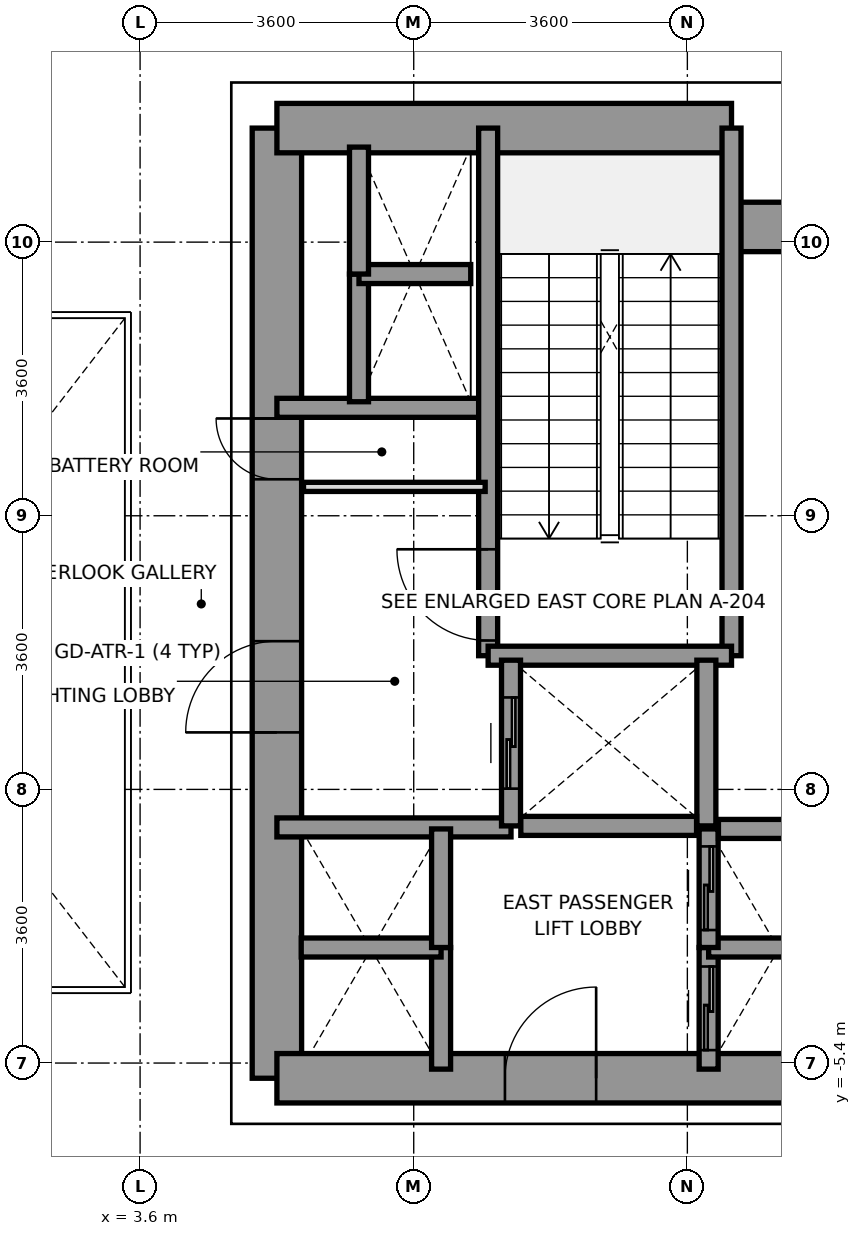
"""IFC4 building model, lengths in metres.
Left out: names, types, materials, properties, quantities, classifications, styles, units other than length and angle.
Written with IfcOpenShell. Run it as: python <this file> out.ifc"""

import sys

from ifc_helpers import new_model, si_unit, direction, frame, frame_2d, origin, place, context, subcontext, project, spatial, rectangle, extrude, source, transform, mapped, element, fill, save


model = new_model("IFC4")
c1 = context("Model", 3, precision=1e-05, world=origin(), true_north=direction((0.0, 1.0)))
c2 = subcontext(c1, "Body", "Model", "MODEL_VIEW")
j1 = project(units=[si_unit("LENGTHUNIT", "METRE"), si_unit("PLANEANGLEUNIT", "RADIAN")], contexts=[c1])
p1 = place(None, origin())
s1 = spatial("IfcSite", under=j1, at=p1, CompositionType="ELEMENT")
p2 = place(p1, origin())
s2 = spatial("IfcBuilding", under=s1, at=p2, CompositionType="ELEMENT")
p3 = place(p2, frame((0.0, 0.0, 5.4)))
s3 = spatial("IfcBuildingStorey", under=s2, at=p3, CompositionType="ELEMENT", Elevation=5.4)
p4 = place(p3, frame((5.4, -5.6, 0.0), z_axis=(0.0, 0.0, 1.0), x_axis=(0.0, 1.0, 0.0)))
e1 = element("IfcWall", 1, at=p4, inside=s3, PredefinedType="SHEAR", context=c2, shape_type="SweptSolid", body=[
    extrude(rectangle(XDim=12.5, YDim=0.65, at=frame_2d((6.25, 0.0))), origin(), (0.0, 0.0, 1.0), 4.52),
])
p5 = place(p4, frame((4.55, 0.0, 0.0)))
e2 = element("IfcOpeningElement", 2, at=p5, cuts=e1, PredefinedType="OPENING", context=c2, shape_type="SweptSolid", body=[
    extrude(rectangle(XDim=1.2, YDim=2.2, at=frame_2d((0.6, 1.1))), frame((0.0, 0.335, 0.0), z_axis=(0.0, -1.0, 0.0), x_axis=(1.0, 0.0, 0.0)), (0.0, 0.0, 1.0), 0.67),
])
p6 = place(p4, frame((7.88, 0.0, 0.0)))
e3 = element("IfcOpeningElement", 3, at=p6, cuts=e1, PredefinedType="OPENING", context=c2, shape_type="SweptSolid", body=[
    extrude(rectangle(XDim=0.8, YDim=2.1, at=frame_2d((0.4, 1.05))), frame((0.0, 0.335, 0.0), z_axis=(0.0, -1.0, 0.0), x_axis=(1.0, 0.0, 0.0)), (0.0, 0.0, 1.0), 0.67),
])
p7 = place(p3, frame((5.4, 6.9, 0.0), z_axis=(0.0, 0.0, 1.0), x_axis=(1.0, 0.0, 0.0)))
e4 = element("IfcWall", 4, at=p7, inside=s3, PredefinedType="SHEAR", context=c2, shape_type="SweptSolid", body=[
    extrude(rectangle(XDim=5.981, YDim=0.65, at=frame_2d((2.991, 0.0))), origin(), (0.0, 0.0, 1.0), 4.52),
])
p8 = place(p3, frame((11.381, 5.6, 0.0), z_axis=(0.0, 0.0, 1.0), x_axis=(1.0, 0.0, 0.0)))
e5 = element("IfcWall", 5, at=p8, inside=s3, PredefinedType="SHEAR", context=c2, shape_type="SweptSolid", body=[
    extrude(rectangle(XDim=1.819, YDim=0.65, at=frame_2d((0.909, 0.0))), origin(), (0.0, 0.0, 1.0), 4.52),
])
p9 = place(p3, frame((5.4, -5.6, 0.0), z_axis=(0.0, 0.0, 1.0), x_axis=(1.0, 0.0, 0.0)))
e6 = element("IfcWall", 6, at=p9, inside=s3, PredefinedType="SHEAR", context=c2, shape_type="SweptSolid", body=[
    extrude(rectangle(XDim=7.8, YDim=0.65, at=frame_2d((3.9, 0.0))), origin(), (0.0, 0.0, 1.0), 4.52),
])
p10 = place(p9, frame((3.0, 0.0, 0.0)))
e7 = element("IfcOpeningElement", 7, at=p10, cuts=e6, PredefinedType="OPENING", context=c2, shape_type="SweptSolid", body=[
    extrude(rectangle(XDim=1.2, YDim=2.2, at=frame_2d((0.6, 1.1))), frame((0.0, 0.335, 0.0), z_axis=(0.0, -1.0, 0.0), x_axis=(1.0, 0.0, 0.0)), (0.0, 0.0, 1.0), 0.67),
])
p11 = place(p3, frame((5.4, 3.22, 0.0), z_axis=(0.0, 0.0, 1.0), x_axis=(1.0, 0.0, 0.0)))
e8 = element("IfcWall", 8, at=p11, inside=s3, PredefinedType="SOLIDWALL", context=c2, shape_type="SweptSolid", body=[
    extrude(rectangle(XDim=2.78, YDim=0.25, at=frame_2d((1.39, 0.0))), origin(), (0.0, 0.0, 1.0), 4.52),
])
p12 = place(p3, frame((5.4, -2.3, 0.0), z_axis=(0.0, 0.0, 1.0), x_axis=(1.0, 0.0, 0.0)))
e9 = element("IfcWall", 9, at=p12, inside=s3, PredefinedType="SOLIDWALL", context=c2, shape_type="SweptSolid", body=[
    extrude(rectangle(XDim=3.08, YDim=0.25, at=frame_2d((1.54, 0.0))), origin(), (0.0, 0.0, 1.0), 4.52),
])
p13 = place(p3, frame((8.179, -0.041, 0.0), z_axis=(0.0, 0.0, 1.0), x_axis=(0.0, 1.0, 0.0)))
e10 = element("IfcWall", 10, at=p13, inside=s3, PredefinedType="SOLIDWALL", context=c2, shape_type="SweptSolid", body=[
    extrude(rectangle(XDim=6.941, YDim=0.25, at=frame_2d((3.47, 0.0))), origin(), (0.0, 0.0, 1.0), 4.52),
])
p14 = place(p13, frame((0.2, 0.0, 0.0)))
e11 = element("IfcOpeningElement", 11, at=p14, cuts=e10, PredefinedType="OPENING", context=c2, shape_type="SweptSolid", body=[
    extrude(rectangle(XDim=1.2, YDim=2.2, at=frame_2d((0.6, 1.1))), frame((0.0, 0.135, 0.0), z_axis=(0.0, -1.0, 0.0), x_axis=(1.0, 0.0, 0.0)), (0.0, 0.0, 1.0), 0.27),
])
p15 = place(p3, frame((11.381, -0.041, 0.0), z_axis=(0.0, 0.0, 1.0), x_axis=(0.0, 1.0, 0.0)))
e12 = element("IfcWall", 12, at=p15, inside=s3, PredefinedType="SOLIDWALL", context=c2, shape_type="SweptSolid", body=[
    extrude(rectangle(XDim=6.941, YDim=0.25, at=frame_2d((3.47, 0.0))), origin(), (0.0, 0.0, 1.0), 4.52),
])
p16 = place(p3, frame((8.179, -0.041, 0.0), z_axis=(0.0, 0.0, 1.0), x_axis=(1.0, 0.0, 0.0)))
e13 = element("IfcWall", 13, at=p16, inside=s3, PredefinedType="SOLIDWALL", context=c2, shape_type="SweptSolid", body=[
    extrude(rectangle(XDim=3.202, YDim=0.25, at=frame_2d((1.601, 0.0))), origin(), (0.0, 0.0, 1.0), 4.52),
])
p17 = place(p3, frame((8.48, -2.28, 0.0), z_axis=(0.0, 0.0, 1.0), x_axis=(0.0, 1.0, 0.0)))
e14 = element("IfcWall", 14, at=p17, inside=s3, PredefinedType="SOLIDWALL", context=c2, shape_type="SweptSolid", body=[
    extrude(rectangle(XDim=2.18, YDim=0.25, at=frame_2d((1.09, 0.0))), origin(), (0.0, 0.0, 1.0), 4.52),
])
p18 = place(p17, frame((0.49, 0.0, 0.0)))
e15 = element("IfcOpeningElement", 15, at=p18, cuts=e14, PredefinedType="OPENING", context=c2, shape_type="SweptSolid", body=[
    extrude(rectangle(XDim=1.2, YDim=2.2, at=frame_2d((0.6, 1.1))), frame((0.0, 0.135, 0.0), z_axis=(0.0, -1.0, 0.0), x_axis=(1.0, 0.0, 0.0)), (0.0, 0.0, 1.0), 0.27),
])
p19 = place(p3, frame((11.05, -2.28, 0.0), z_axis=(0.0, 0.0, 1.0), x_axis=(0.0, 1.0, 0.0)))
e16 = element("IfcWall", 16, at=p19, inside=s3, PredefinedType="SOLIDWALL", context=c2, shape_type="SweptSolid", body=[
    extrude(rectangle(XDim=2.18, YDim=0.25, at=frame_2d((1.09, 0.0))), origin(), (0.0, 0.0, 1.0), 4.52),
])
p20 = place(p3, frame((8.609, -2.28, 0.0), z_axis=(0.0, 0.0, 1.0), x_axis=(1.0, 0.0, 0.0)))
e17 = element("IfcWall", 17, at=p20, inside=s3, PredefinedType="SOLIDWALL", context=c2, shape_type="SweptSolid", body=[
    extrude(rectangle(XDim=2.312, YDim=0.25, at=frame_2d((1.156, 0.0))), origin(), (0.0, 0.0, 1.0), 4.52),
])
p21 = place(p3, frame((11.08, -5.48, 0.0), z_axis=(0.0, 0.0, 1.0), x_axis=(0.0, 1.0, 0.0)))
e18 = element("IfcWall", 18, at=p21, inside=s3, PredefinedType="SOLIDWALL", context=c2, shape_type="SweptSolid", body=[
    extrude(rectangle(XDim=1.6, YDim=0.25, at=frame_2d((0.8, 0.0))), origin(), (0.0, 0.0, 1.0), 4.52),
])
p22 = place(p21, frame((0.25, 0.0, 0.0)))
e19 = element("IfcOpeningElement", 19, at=p22, cuts=e18, PredefinedType="OPENING", context=c2, shape_type="SweptSolid", body=[
    extrude(rectangle(XDim=1.1, YDim=2.2, at=frame_2d((0.55, 1.1))), frame((0.0, 0.135, 0.0), z_axis=(0.0, -1.0, 0.0), x_axis=(1.0, 0.0, 0.0)), (0.0, 0.0, 1.0), 0.27),
])
p23 = place(p3, frame((11.08, -3.88, 0.0), z_axis=(0.0, 0.0, 1.0), x_axis=(1.0, 0.0, 0.0)))
e20 = element("IfcWall", 20, at=p23, inside=s3, PredefinedType="SOLIDWALL", context=c2, shape_type="SweptSolid", body=[
    extrude(rectangle(XDim=1.84, YDim=0.25, at=frame_2d((0.92, 0.0))), origin(), (0.0, 0.0, 1.0), 4.52),
])
p24 = place(p3, frame((11.08, -3.88, 0.0), z_axis=(0.0, 0.0, 1.0), x_axis=(0.0, 1.0, 0.0)))
e21 = element("IfcWall", 21, at=p24, inside=s3, PredefinedType="SOLIDWALL", context=c2, shape_type="SweptSolid", body=[
    extrude(rectangle(XDim=1.56, YDim=0.25, at=frame_2d((0.78, 0.0))), origin(), (0.0, 0.0, 1.0), 4.52),
])
p25 = place(p24, frame((0.23, 0.0, 0.0)))
e22 = element("IfcOpeningElement", 22, at=p25, cuts=e21, PredefinedType="OPENING", context=c2, shape_type="SweptSolid", body=[
    extrude(rectangle(XDim=1.1, YDim=2.2, at=frame_2d((0.55, 1.1))), frame((0.0, 0.135, 0.0), z_axis=(0.0, -1.0, 0.0), x_axis=(1.0, 0.0, 0.0)), (0.0, 0.0, 1.0), 0.27),
])
p26 = place(p3, frame((11.209, -2.32, 0.0), z_axis=(0.0, 0.0, 1.0), x_axis=(1.0, 0.0, 0.0)))
e23 = element("IfcWall", 23, at=p26, inside=s3, PredefinedType="SOLIDWALL", context=c2, shape_type="SweptSolid", body=[
    extrude(rectangle(XDim=1.582, YDim=0.25, at=frame_2d((0.791, 0.0))), origin(), (0.0, 0.0, 1.0), 4.52),
])
p27 = place(p3, frame((7.56, -5.48, 0.0), z_axis=(0.0, 0.0, 1.0), x_axis=(0.0, 1.0, 0.0)))
e24 = element("IfcWall", 24, at=p27, inside=s3, PredefinedType="SOLIDWALL", context=c2, shape_type="SweptSolid", body=[
    extrude(rectangle(XDim=1.6, YDim=0.25, at=frame_2d((0.8, 0.0))), origin(), (0.0, 0.0, 1.0), 4.52),
])
p28 = place(p3, frame((5.72, -3.88, 0.0), z_axis=(0.0, 0.0, 1.0), x_axis=(1.0, 0.0, 0.0)))
e25 = element("IfcWall", 25, at=p28, inside=s3, PredefinedType="SOLIDWALL", context=c2, shape_type="SweptSolid", body=[
    extrude(rectangle(XDim=1.84, YDim=0.25, at=frame_2d((0.92, 0.0))), origin(), (0.0, 0.0, 1.0), 4.52),
])
p29 = place(p3, frame((7.56, -3.88, 0.0), z_axis=(0.0, 0.0, 1.0), x_axis=(0.0, 1.0, 0.0)))
e26 = element("IfcWall", 26, at=p29, inside=s3, PredefinedType="SOLIDWALL", context=c2, shape_type="SweptSolid", body=[
    extrude(rectangle(XDim=1.56, YDim=0.25, at=frame_2d((0.78, 0.0))), origin(), (0.0, 0.0, 1.0), 4.52),
])
p30 = place(p3, frame((6.48, 3.3, 0.0), z_axis=(0.0, 0.0, 1.0), x_axis=(0.0, 1.0, 0.0)))
e27 = element("IfcWall", 27, at=p30, inside=s3, PredefinedType="SOLIDWALL", context=c2, shape_type="SweptSolid", body=[
    extrude(rectangle(XDim=1.68, YDim=0.25, at=frame_2d((0.84, 0.0))), origin(), (0.0, 0.0, 1.0), 4.52),
])
p31 = place(p3, frame((6.48, 4.98, 0.0), z_axis=(0.0, 0.0, 1.0), x_axis=(1.0, 0.0, 0.0)))
e28 = element("IfcWall", 28, at=p31, inside=s3, PredefinedType="SOLIDWALL", context=c2, shape_type="SweptSolid", body=[
    extrude(rectangle(XDim=1.47, YDim=0.25, at=frame_2d((0.735, 0.0))), origin(), (0.0, 0.0, 1.0), 4.52),
])
p32 = place(p3, frame((6.48, 4.98, 0.0), z_axis=(0.0, 0.0, 1.0), x_axis=(0.0, 1.0, 0.0)))
e29 = element("IfcWall", 29, at=p32, inside=s3, PredefinedType="SOLIDWALL", context=c2, shape_type="SweptSolid", body=[
    extrude(rectangle(XDim=1.67, YDim=0.25, at=frame_2d((0.835, 0.0))), origin(), (0.0, 0.0, 1.0), 4.52),
])
p33 = place(p3, frame((5.75, 2.18, 0.0), z_axis=(0.0, 0.0, 1.0), x_axis=(1.0, 0.0, 0.0)))
e30 = element("IfcWall", 30, at=p33, inside=s3, PredefinedType="PARTITIONING", context=c2, shape_type="SweptSolid", body=[
    extrude(rectangle(XDim=2.39, YDim=0.12, at=frame_2d((1.195, 0.0))), origin(), (0.0, 0.0, 1.0), 3.62),
])
m1 = source(origin(), c2, "Body", "SweptSolid", [
    extrude(rectangle(XDim=1.2, YDim=2.2, at=frame_2d((0.6, 1.1))), frame((0.0, 0.025, 0.0), z_axis=(0.0, -1.0, 0.0), x_axis=(1.0, 0.0, 0.0)), (0.0, 0.0, 1.0), 0.05),
])
p34 = place(p14, origin())
e31 = element("IfcDoor", 31, at=p34, inside=s3, OperationType="SINGLE_SWING_RIGHT", PredefinedType="DOOR", context=c2, shape_type="MappedRepresentation", body=[
    mapped(m1, transform((0.0, 0.0, 0.0), x_axis=(1.0, 0.0, 0.0), y_axis=(0.0, 1.0, 0.0), z_axis=(0.0, 0.0, 1.0), scale=1.0)),
])
fill(e11, e31)
p35 = place(p5, origin())
e32 = element("IfcDoor", 32, at=p35, inside=s3, OperationType="SINGLE_SWING_LEFT", PredefinedType="DOOR", context=c2, shape_type="MappedRepresentation", body=[
    mapped(m1, transform((0.0, 0.0, 0.0), x_axis=(1.0, 0.0, 0.0), y_axis=(0.0, 1.0, 0.0), z_axis=(0.0, 0.0, 1.0), scale=1.0)),
])
fill(e2, e32)
p36 = place(p10, origin())
e33 = element("IfcDoor", 33, at=p36, inside=s3, OperationType="SINGLE_SWING_RIGHT", PredefinedType="DOOR", context=c2, shape_type="MappedRepresentation", body=[
    mapped(m1, transform((0.0, 0.0, 0.0), x_axis=(1.0, 0.0, 0.0), y_axis=(0.0, 1.0, 0.0), z_axis=(0.0, 0.0, 1.0), scale=1.0)),
])
fill(e7, e33)
m2 = source(origin(), c2, "Body", "SweptSolid", [
    extrude(rectangle(XDim=0.8, YDim=2.1, at=frame_2d((0.4, 1.05))), frame((0.0, 0.025, 0.0), z_axis=(0.0, -1.0, 0.0), x_axis=(1.0, 0.0, 0.0)), (0.0, 0.0, 1.0), 0.05),
])
p37 = place(p6, origin())
e34 = element("IfcDoor", 34, at=p37, inside=s3, OperationType="SINGLE_SWING_RIGHT", PredefinedType="DOOR", context=c2, shape_type="MappedRepresentation", body=[
    mapped(m2, transform((0.0, 0.0, 0.0), x_axis=(1.0, 0.0, 0.0), y_axis=(0.0, 1.0, 0.0), z_axis=(0.0, 0.0, 1.0), scale=1.0)),
])
fill(e3, e34)
p38 = place(p18, origin())
e35 = element("IfcDoor", 35, at=p38, inside=s3, OperationType="SLIDING_TO_RIGHT", PredefinedType="DOOR", context=c2, shape_type="MappedRepresentation", body=[
    mapped(m1, transform((0.0, 0.0, 0.0), x_axis=(1.0, 0.0, 0.0), y_axis=(0.0, 1.0, 0.0), z_axis=(0.0, 0.0, 1.0), scale=1.0)),
])
fill(e15, e35)
m3 = source(origin(), c2, "Body", "SweptSolid", [
    extrude(rectangle(XDim=1.1, YDim=2.2, at=frame_2d((0.55, 1.1))), frame((0.0, 0.025, 0.0), z_axis=(0.0, -1.0, 0.0), x_axis=(1.0, 0.0, 0.0)), (0.0, 0.0, 1.0), 0.05),
])
p39 = place(p22, origin())
e36 = element("IfcDoor", 36, at=p39, inside=s3, OperationType="SLIDING_TO_LEFT", PredefinedType="DOOR", context=c2, shape_type="MappedRepresentation", body=[
    mapped(m3, transform((0.0, 0.0, 0.0), x_axis=(1.0, 0.0, 0.0), y_axis=(0.0, 1.0, 0.0), z_axis=(0.0, 0.0, 1.0), scale=1.0)),
])
fill(e19, e36)
p40 = place(p25, origin())
e37 = element("IfcDoor", 37, at=p40, inside=s3, OperationType="SLIDING_TO_LEFT", PredefinedType="DOOR", context=c2, shape_type="MappedRepresentation", body=[
    mapped(m3, transform((0.0, 0.0, 0.0), x_axis=(1.0, 0.0, 0.0), y_axis=(0.0, 1.0, 0.0), z_axis=(0.0, 0.0, 1.0), scale=1.0)),
])
fill(e22, e37)
save(model, sys.argv[1])
